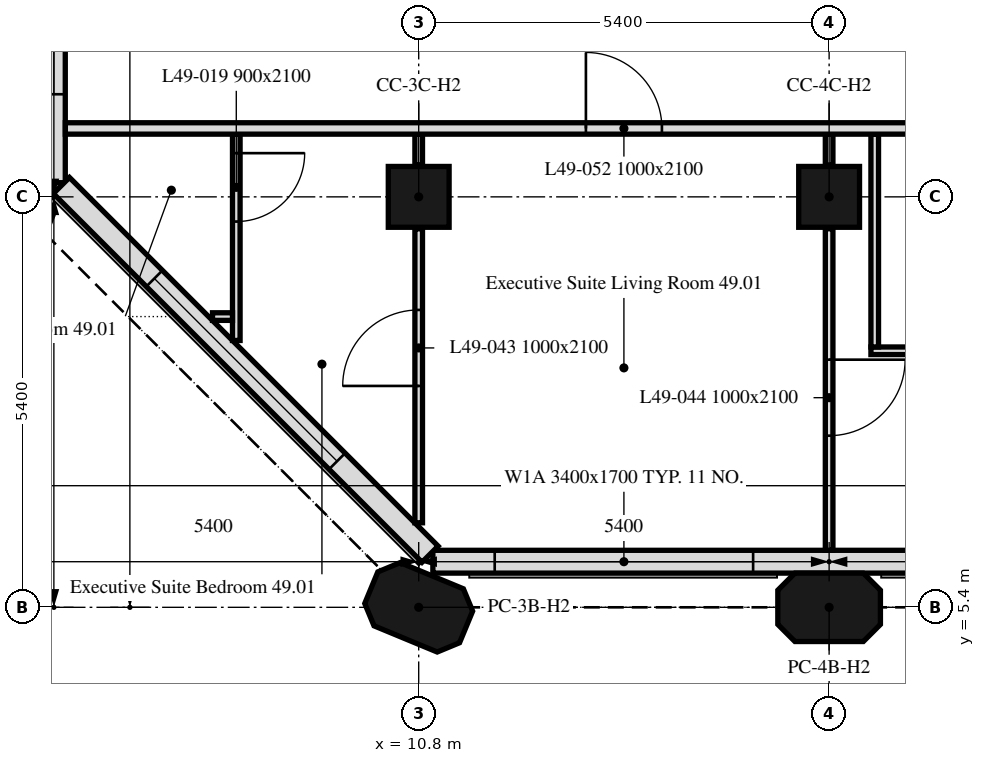
"""IFC4 building model, lengths in metres.
Left out: names, types, materials, properties, quantities, classifications, styles, units other than length and angle.
Written with IfcOpenShell. Run it as: python <this file> out.ifc"""

import sys

from ifc_helpers import new_model, si_unit, direction, frame, frame_2d, origin, origin_2d, place, context, subcontext, project, spatial, polyline, rectangle, outline, extrude, element, fill, save


model = new_model("IFC4")
c1 = context("Model", 3, precision=1e-05, world=origin(), true_north=direction((0.0, 1.0)))
c2 = subcontext(c1, "Body", "Model", "MODEL_VIEW")
j1 = project(units=[si_unit("LENGTHUNIT", "METRE"), si_unit("PLANEANGLEUNIT", "RADIAN")], contexts=[c1])
p1 = place(None, origin())
s1 = spatial("IfcSite", under=j1, at=p1, CompositionType="ELEMENT")
p2 = place(p1, origin())
s2 = spatial("IfcBuilding", under=s1, at=p2, CompositionType="ELEMENT")
p3 = place(p2, frame((0.0, 0.0, 200.5)))
s3 = spatial("IfcBuildingStorey", under=s2, at=p3, CompositionType="ELEMENT", Elevation=200.5)
for number, where, z_axis, x_axis in (
    (1, (10.8, 5.4, 0.0), (0.0, 0.0, 1.0), (-0.924, 0.383, 0.0)),
    (2, (16.2, 5.4, 0.0), (0.0, 0.0, 1.0), (1.0, 0.0, 0.0)),
    (3, (5.4, 10.8, 0.0), (0.0, 0.0, 1.0), (-0.383, 0.924, 0.0)),
):
    element("IfcColumn", number, at=place(p3, frame(where, z_axis=z_axis, x_axis=x_axis)), inside=s3, PredefinedType="COLUMN", context=c2, shape_type="SweptSolid", body=[
        extrude(outline(polyline([(-0.45, -0.45), (0.45, -0.45), (0.675, -0.225), (0.675, 0.225), (0.45, 0.45), (-0.45, 0.45), (-0.675, 0.225), (-0.675, -0.225), (-0.45, -0.45)])), origin(), (0.0, 0.0, 1.0), 3.0),
    ])
for number, where, z_axis, x_axis in (
    (4, (10.8, 10.8, 0.0), (0.0, 0.0, 1.0), (1.0, 0.0, 0.0)),
    (5, (16.2, 10.8, 0.0), (0.0, 0.0, 1.0), (1.0, 0.0, 0.0)),
):
    element("IfcColumn", number, at=place(p3, frame(where, z_axis=z_axis, x_axis=x_axis)), inside=s3, PredefinedType="COLUMN", context=c2, shape_type="SweptSolid", body=[
        extrude(rectangle(XDim=0.8, YDim=0.8, at=origin_2d()), origin(), (0.0, 0.0, 1.0), 3.0),
    ])
p4 = place(p3, frame((10.986, 6.0, 0.0), z_axis=(0.0, 0.0, 1.0), x_axis=(1.0, 0.0, 0.0)))
e6 = element("IfcWall", 6, at=p4, inside=s3, PredefinedType="SOLIDWALL", context=c2, shape_type="SweptSolid", body=[
    extrude(rectangle(XDim=32.027, YDim=0.3, at=frame_2d((16.014, 0.0))), origin(), (0.0, 0.0, 1.0), 3.0),
])
p5 = place(p4, frame((0.814, 0.0, 0.9)))
e7 = element("IfcOpeningElement", 7, at=p5, cuts=e6, PredefinedType="OPENING", context=c2, shape_type="SweptSolid", body=[
    extrude(rectangle(XDim=3.4, YDim=1.7, at=frame_2d((1.7, 0.85))), frame((0.0, 0.16, 0.0), z_axis=(0.0, -1.0, 0.0), x_axis=(1.0, 0.0, 0.0)), (0.0, 0.0, 1.0), 0.32),
])
p6 = place(p4, frame((6.564, 0.0, 0.9)))
e8 = element("IfcOpeningElement", 8, at=p6, cuts=e6, PredefinedType="OPENING", context=c2, shape_type="SweptSolid", body=[
    extrude(rectangle(XDim=1.1, YDim=1.7, at=frame_2d((0.55, 0.85))), frame((0.0, 0.16, 0.0), z_axis=(0.0, -1.0, 0.0), x_axis=(1.0, 0.0, 0.0)), (0.0, 0.0, 1.0), 0.32),
])
p7 = place(p4, frame((11.614, 0.0, 0.9)))
e9 = element("IfcOpeningElement", 9, at=p7, cuts=e6, PredefinedType="OPENING", context=c2, shape_type="SweptSolid", body=[
    extrude(rectangle(XDim=3.4, YDim=1.7, at=frame_2d((1.7, 0.85))), frame((0.0, 0.16, 0.0), z_axis=(0.0, -1.0, 0.0), x_axis=(1.0, 0.0, 0.0)), (0.0, 0.0, 1.0), 0.32),
])
p8 = place(p4, frame((17.364, 0.0, 0.9)))
e10 = element("IfcOpeningElement", 10, at=p8, cuts=e6, PredefinedType="OPENING", context=c2, shape_type="SweptSolid", body=[
    extrude(rectangle(XDim=1.1, YDim=1.7, at=frame_2d((0.55, 0.85))), frame((0.0, 0.16, 0.0), z_axis=(0.0, -1.0, 0.0), x_axis=(1.0, 0.0, 0.0)), (0.0, 0.0, 1.0), 0.32),
])
p9 = place(p4, frame((22.414, 0.0, 0.9)))
e11 = element("IfcOpeningElement", 11, at=p9, cuts=e6, PredefinedType="OPENING", context=c2, shape_type="SweptSolid", body=[
    extrude(rectangle(XDim=3.4, YDim=1.7, at=frame_2d((1.7, 0.85))), frame((0.0, 0.16, 0.0), z_axis=(0.0, -1.0, 0.0), x_axis=(1.0, 0.0, 0.0)), (0.0, 0.0, 1.0), 0.32),
])
p10 = place(p4, frame((28.164, 0.0, 0.9)))
e12 = element("IfcOpeningElement", 12, at=p10, cuts=e6, PredefinedType="OPENING", context=c2, shape_type="SweptSolid", body=[
    extrude(rectangle(XDim=1.1, YDim=1.7, at=frame_2d((0.55, 0.85))), frame((0.0, 0.16, 0.0), z_axis=(0.0, -1.0, 0.0), x_axis=(1.0, 0.0, 0.0)), (0.0, 0.0, 1.0), 0.32),
])
p11 = place(p3, frame((6.0, 16.2, 0.0), z_axis=(0.0, 0.0, 1.0), x_axis=(0.0, -1.0, 0.0)))
e13 = element("IfcWall", 13, at=p11, inside=s3, PredefinedType="SOLIDWALL", context=c2, shape_type="SweptSolid", body=[
    extrude(rectangle(XDim=5.214, YDim=0.3, at=frame_2d((2.607, 0.0))), origin(), (0.0, 0.0, 1.0), 3.0),
])
p12 = place(p11, frame((1.35, 0.0, 0.9)))
e14 = element("IfcOpeningElement", 14, at=p12, cuts=e13, PredefinedType="OPENING", context=c2, shape_type="SweptSolid", body=[
    extrude(rectangle(XDim=1.1, YDim=1.7, at=frame_2d((0.55, 0.85))), frame((0.0, 0.16, 0.0), z_axis=(0.0, -1.0, 0.0), x_axis=(1.0, 0.0, 0.0)), (0.0, 0.0, 1.0), 0.32),
])
p13 = place(p11, frame((2.95, 0.0, 0.9)))
e15 = element("IfcOpeningElement", 15, at=p13, cuts=e13, PredefinedType="OPENING", context=c2, shape_type="SweptSolid", body=[
    extrude(rectangle(XDim=1.1, YDim=1.7, at=frame_2d((0.55, 0.85))), frame((0.0, 0.16, 0.0), z_axis=(0.0, -1.0, 0.0), x_axis=(1.0, 0.0, 0.0)), (0.0, 0.0, 1.0), 0.32),
])
p14 = place(p3, frame((6.099, 10.949, 0.0), z_axis=(0.0, 0.0, 1.0), x_axis=(0.707106781187, -0.707106781187, 0.0)))
e16 = element("IfcWall", 16, at=p14, inside=s3, PredefinedType="SOLIDWALL", context=c2, shape_type="SweptSolid", body=[
    extrude(rectangle(XDim=6.86, YDim=0.3, at=frame_2d((3.43, 0.0))), origin(), (0.0, 0.0, 1.0), 3.0),
])
p15 = place(p14, frame((1.73, 0.0, 0.9)))
e17 = element("IfcOpeningElement", 17, at=p15, cuts=e16, PredefinedType="OPENING", context=c2, shape_type="SweptSolid", body=[
    extrude(rectangle(XDim=3.4, YDim=1.7, at=frame_2d((1.7, 0.85))), frame((0.0, 0.16, 0.0), z_axis=(0.0, -1.0, 0.0), x_axis=(1.0, 0.0, 0.0)), (0.0, 0.0, 1.0), 0.32),
])
p16 = place(p3, frame((10.8, 6.512, 0.0), z_axis=(0.0, 0.0, 1.0), x_axis=(0.0, 1.0, 0.0)))
e18 = element("IfcWall", 18, at=p16, inside=s3, PredefinedType="PARTITIONING", context=c2, shape_type="SweptSolid", body=[
    extrude(rectangle(XDim=3.868, YDim=0.1, at=frame_2d((1.934, 0.0))), origin(), (0.0, 0.0, 1.0), 3.0),
])
p17 = place(p16, frame((1.8, 0.0, 0.0)))
e19 = element("IfcOpeningElement", 19, at=p17, cuts=e18, PredefinedType="OPENING", context=c2, shape_type="SweptSolid", body=[
    extrude(rectangle(XDim=1.0, YDim=2.1, at=frame_2d((0.5, 1.05))), frame((0.0, 0.05, 0.0), z_axis=(0.0, -1.0, 0.0), x_axis=(1.0, 0.0, 0.0)), (0.0, 0.0, 1.0), 0.1),
])
p18 = place(p3, frame((10.8, 11.22, 0.0), z_axis=(0.0, 0.0, 1.0), x_axis=(0.0, 1.0, 0.0)))
e20 = element("IfcWall", 20, at=p18, inside=s3, PredefinedType="PARTITIONING", context=c2, shape_type="SweptSolid", body=[
    extrude(rectangle(XDim=0.405, YDim=0.1, at=frame_2d((0.203, 0.0))), origin(), (0.0, 0.0, 1.0), 3.0),
])
p19 = place(p3, frame((8.4, 11.625, 0.0), z_axis=(0.0, 0.0, 1.0), x_axis=(0.0, -1.0, 0.0)))
e21 = element("IfcWall", 21, at=p19, inside=s3, PredefinedType="PARTITIONING", context=c2, shape_type="SweptSolid", body=[
    extrude(rectangle(XDim=2.714, YDim=0.1, at=frame_2d((1.357, 0.0))), origin(), (0.0, 0.0, 1.0), 3.0),
])
p20 = place(p19, frame((0.25, 0.0, 0.0)))
e22 = element("IfcOpeningElement", 22, at=p20, cuts=e21, PredefinedType="OPENING", context=c2, shape_type="SweptSolid", body=[
    extrude(rectangle(XDim=0.9, YDim=2.1, at=frame_2d((0.45, 1.05))), frame((0.0, 0.05, 0.0), z_axis=(0.0, -1.0, 0.0), x_axis=(1.0, 0.0, 0.0)), (0.0, 0.0, 1.0), 0.1),
])
p21 = place(p3, frame((8.35, 9.225, 0.0), z_axis=(0.0, 0.0, 1.0), x_axis=(-1.0, 0.0, 0.0)))
e23 = element("IfcWall", 23, at=p21, inside=s3, PredefinedType="PARTITIONING", context=c2, shape_type="SweptSolid", body=[
    extrude(rectangle(XDim=0.263, YDim=0.1, at=frame_2d((0.131, 0.0))), origin(), (0.0, 0.0, 1.0), 3.0),
])
p22 = place(p3, frame((19.15, 8.775, 0.0), z_axis=(0.0, 0.0, 1.0), x_axis=(-1.0, 0.0, 0.0)))
e24 = element("IfcWall", 24, at=p22, inside=s3, PredefinedType="PARTITIONING", context=c2, shape_type="SweptSolid", body=[
    extrude(rectangle(XDim=2.4, YDim=0.1, at=frame_2d((1.2, 0.0))), origin(), (0.0, 0.0, 1.0), 3.0),
])
p23 = place(p3, frame((16.8, 8.825, 0.0), z_axis=(0.0, 0.0, 1.0), x_axis=(0.0, 1.0, 0.0)))
e25 = element("IfcWall", 25, at=p23, inside=s3, PredefinedType="PARTITIONING", context=c2, shape_type="SweptSolid", body=[
    extrude(rectangle(XDim=2.8, YDim=0.1, at=frame_2d((1.4, 0.0))), origin(), (0.0, 0.0, 1.0), 3.0),
])
p24 = place(p3, frame((16.2, 11.625, 0.0), z_axis=(0.0, 0.0, 1.0), x_axis=(0.0, -1.0, 0.0)))
e26 = element("IfcWall", 26, at=p24, inside=s3, PredefinedType="PARTITIONING", context=c2, shape_type="SweptSolid", body=[
    extrude(rectangle(XDim=0.405, YDim=0.1, at=frame_2d((0.203, 0.0))), origin(), (0.0, 0.0, 1.0), 3.0),
])
p25 = place(p3, frame((16.2, 10.38, 0.0), z_axis=(0.0, 0.0, 1.0), x_axis=(0.0, -1.0, 0.0)))
e27 = element("IfcWall", 27, at=p25, inside=s3, PredefinedType="PARTITIONING", context=c2, shape_type="SweptSolid", body=[
    extrude(rectangle(XDim=4.229, YDim=0.1, at=frame_2d((2.115, 0.0))), origin(), (0.0, 0.0, 1.0), 3.0),
])
p26 = place(p25, frame((1.722, 0.0, 0.0)))
e28 = element("IfcOpeningElement", 28, at=p26, cuts=e27, PredefinedType="OPENING", context=c2, shape_type="SweptSolid", body=[
    extrude(rectangle(XDim=1.0, YDim=2.1, at=frame_2d((0.5, 1.05))), frame((0.0, 0.05, 0.0), z_axis=(0.0, -1.0, 0.0), x_axis=(1.0, 0.0, 0.0)), (0.0, 0.0, 1.0), 0.1),
])
p27 = place(p3, frame((6.151, 11.7, 0.0), z_axis=(0.0, 0.0, 1.0), x_axis=(1.0, 0.0, 0.0)))
e29 = element("IfcWall", 29, at=p27, inside=s3, PredefinedType="PARTITIONING", context=c2, shape_type="SweptSolid", body=[
    extrude(rectangle(XDim=41.698, YDim=0.15, at=frame_2d((20.849, 0.0))), origin(), (0.0, 0.0, 1.0), 3.0),
])
p28 = place(p27, frame((37.954, 0.0, 0.0)))
e30 = element("IfcOpeningElement", 30, at=p28, cuts=e29, PredefinedType="OPENING", context=c2, shape_type="SweptSolid", body=[
    extrude(rectangle(XDim=1.0, YDim=2.1, at=frame_2d((0.5, 1.05))), frame((0.0, 0.075, 0.0), z_axis=(0.0, -1.0, 0.0), x_axis=(1.0, 0.0, 0.0)), (0.0, 0.0, 1.0), 0.15),
])
p29 = place(p27, frame((6.849, 0.0, 0.0)))
e31 = element("IfcOpeningElement", 31, at=p29, cuts=e29, PredefinedType="OPENING", context=c2, shape_type="SweptSolid", body=[
    extrude(rectangle(XDim=1.0, YDim=2.1, at=frame_2d((0.5, 1.05))), frame((0.0, 0.075, 0.0), z_axis=(0.0, -1.0, 0.0), x_axis=(1.0, 0.0, 0.0)), (0.0, 0.0, 1.0), 0.15),
])
p30 = place(p27, frame((23.049, 0.0, 0.0)))
e32 = element("IfcOpeningElement", 32, at=p30, cuts=e29, PredefinedType="OPENING", context=c2, shape_type="SweptSolid", body=[
    extrude(rectangle(XDim=1.0, YDim=2.1, at=frame_2d((0.5, 1.05))), frame((0.0, 0.075, 0.0), z_axis=(0.0, -1.0, 0.0), x_axis=(1.0, 0.0, 0.0)), (0.0, 0.0, 1.0), 0.15),
])
p31 = place(p5, origin())
e33 = element("IfcWindow", 33, at=p31, inside=s3, PartitioningType="SINGLE_PANEL", PredefinedType="WINDOW", context=c2, shape_type="SweptSolid", body=[
    extrude(rectangle(XDim=3.4, YDim=1.7, at=frame_2d((1.7, 0.85))), frame((0.0, 0.03, 0.0), z_axis=(0.0, -1.0, 0.0), x_axis=(1.0, 0.0, 0.0)), (0.0, 0.0, 1.0), 0.06),
])
fill(e7, e33)
p32 = place(p13, origin())
e34 = element("IfcWindow", 34, at=p32, inside=s3, PartitioningType="SINGLE_PANEL", PredefinedType="WINDOW", context=c2, shape_type="SweptSolid", body=[
    extrude(rectangle(XDim=1.1, YDim=1.7, at=frame_2d((0.55, 0.85))), frame((0.0, 0.03, 0.0), z_axis=(0.0, -1.0, 0.0), x_axis=(1.0, 0.0, 0.0)), (0.0, 0.0, 1.0), 0.06),
])
fill(e15, e34)
p33 = place(p15, origin())
e35 = element("IfcWindow", 35, at=p33, inside=s3, PartitioningType="SINGLE_PANEL", PredefinedType="WINDOW", context=c2, shape_type="SweptSolid", body=[
    extrude(rectangle(XDim=3.4, YDim=1.7, at=frame_2d((1.7, 0.85))), frame((0.0, 0.03, 0.0), z_axis=(0.0, -1.0, 0.0), x_axis=(1.0, 0.0, 0.0)), (0.0, 0.0, 1.0), 0.06),
])
fill(e17, e35)
p34 = place(p20, origin())
e36 = element("IfcDoor", 36, at=p34, inside=s3, OperationType="SINGLE_SWING_LEFT", PredefinedType="DOOR", context=c2, shape_type="SweptSolid", body=[
    extrude(rectangle(XDim=0.9, YDim=2.1, at=frame_2d((0.45, 1.05))), frame((0.0, 0.025, 0.0), z_axis=(0.0, -1.0, 0.0), x_axis=(1.0, 0.0, 0.0)), (0.0, 0.0, 1.0), 0.05),
])
fill(e22, e36)
p35 = place(p17, origin())
e37 = element("IfcDoor", 37, at=p35, inside=s3, OperationType="SINGLE_SWING_LEFT", PredefinedType="DOOR", context=c2, shape_type="SweptSolid", body=[
    extrude(rectangle(XDim=1.0, YDim=2.1, at=frame_2d((0.5, 1.05))), frame((0.0, 0.025, 0.0), z_axis=(0.0, -1.0, 0.0), x_axis=(1.0, 0.0, 0.0)), (0.0, 0.0, 1.0), 0.05),
])
fill(e19, e37)
p36 = place(p26, origin())
e38 = element("IfcDoor", 38, at=p36, inside=s3, OperationType="SINGLE_SWING_LEFT", PredefinedType="DOOR", context=c2, shape_type="SweptSolid", body=[
    extrude(rectangle(XDim=1.0, YDim=2.1, at=frame_2d((0.5, 1.05))), frame((0.0, 0.025, 0.0), z_axis=(0.0, -1.0, 0.0), x_axis=(1.0, 0.0, 0.0)), (0.0, 0.0, 1.0), 0.05),
])
fill(e28, e38)
p37 = place(p29, origin())
e39 = element("IfcDoor", 39, at=p37, inside=s3, OperationType="SINGLE_SWING_RIGHT", PredefinedType="DOOR", context=c2, shape_type="SweptSolid", body=[
    extrude(rectangle(XDim=1.0, YDim=2.1, at=frame_2d((0.5, 1.05))), frame((0.0, 0.025, 0.0), z_axis=(0.0, -1.0, 0.0), x_axis=(1.0, 0.0, 0.0)), (0.0, 0.0, 1.0), 0.05),
])
fill(e31, e39)
save(model, sys.argv[1])
